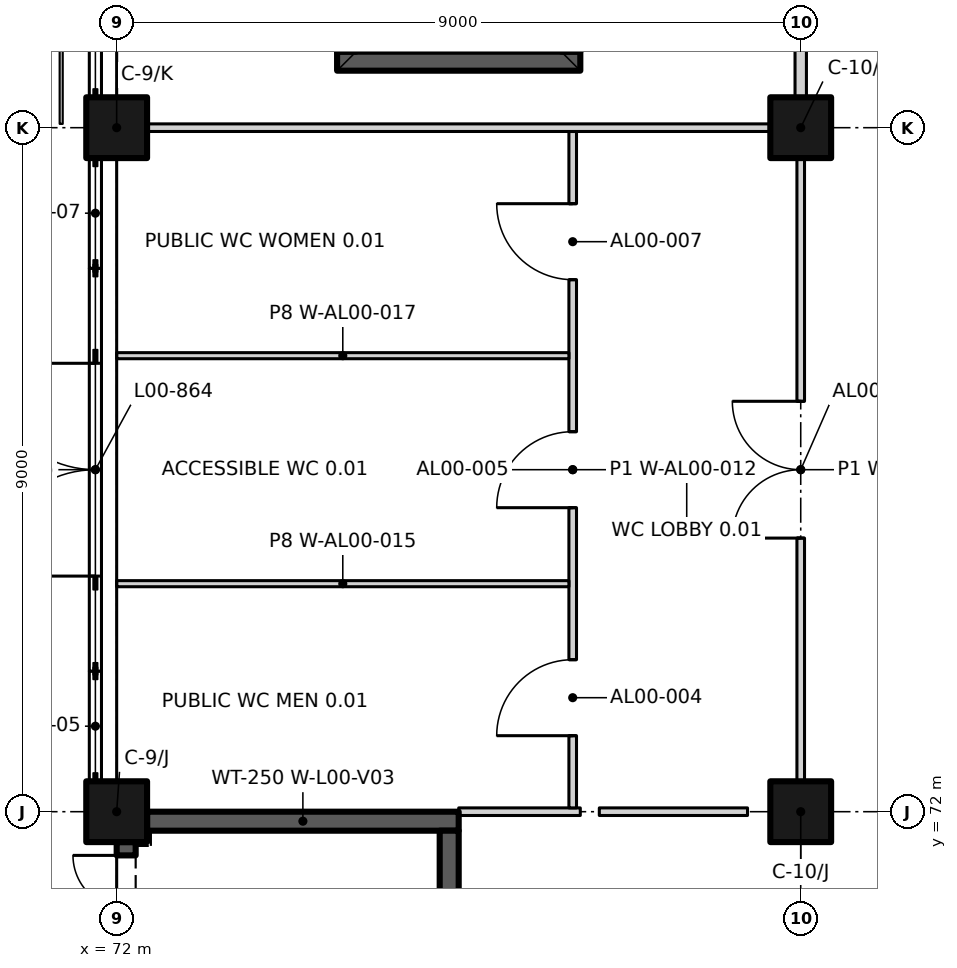
"""IFC4 building model, lengths in metres.
Left out: names, types, materials, properties, quantities, classifications, styles, units other than length and angle.
Written with IfcOpenShell. Run it as: python <this file> out.ifc"""

import sys

from ifc_helpers import new_model, si_unit, direction, frame, frame_2d, origin, origin_2d, place, context, subcontext, project, spatial, rectangle, extrude, element, fill, save


model = new_model("IFC4")
c1 = context("Model", 3, precision=1e-05, world=origin(), true_north=direction((0.0, 1.0)))
c2 = subcontext(c1, "Body", "Model", "MODEL_VIEW")
j1 = project(units=[si_unit("LENGTHUNIT", "METRE"), si_unit("PLANEANGLEUNIT", "RADIAN")], contexts=[c1])
p1 = place(None, origin())
s1 = spatial("IfcSite", under=j1, at=p1, CompositionType="ELEMENT")
p2 = place(p1, origin())
s2 = spatial("IfcBuilding", under=s1, at=p2, CompositionType="ELEMENT")
p3 = place(p2, origin())
s3 = spatial("IfcBuildingStorey", under=s2, at=p3, CompositionType="ELEMENT", Elevation=0.0)
for number, where, z_axis, x_axis in (
    (1, (72.0, 72.0, 0.0), (0.0, 0.0, 1.0), (1.0, 0.0, 0.0)),
    (2, (81.0, 72.0, 0.0), (0.0, 0.0, 1.0), (1.0, 0.0, 0.0)),
    (3, (72.0, 81.0, 0.0), (0.0, 0.0, 1.0), (1.0, 0.0, 0.0)),
    (4, (81.0, 81.0, 0.0), (0.0, 0.0, 1.0), (1.0, 0.0, 0.0)),
):
    element("IfcColumn", number, at=place(p3, frame(where, z_axis=z_axis, x_axis=x_axis)), inside=s3, PredefinedType="COLUMN", context=c2, shape_type="SweptSolid", body=[
        extrude(rectangle(XDim=0.8, YDim=0.8, at=origin_2d()), origin(), (0.0, 0.0, 1.0), 6.0),
    ])
p4 = place(p3, frame((72.4, 71.875, 0.0), z_axis=(0.0, 0.0, 1.0), x_axis=(1.0, 0.0, 0.0)))
e5 = element("IfcWall", 5, at=p4, inside=s3, PredefinedType="SHEAR", context=c2, shape_type="SweptSolid", body=[
    extrude(rectangle(XDim=4.1, YDim=0.25, at=frame_2d((2.05, 0.0))), origin(), (0.0, 0.0, 1.0), 5.7),
])
p5 = place(p3, frame((72.125, 63.4, 0.0), z_axis=(0.0, 0.0, 1.0), x_axis=(0.0, 1.0, 0.0)))
e6 = element("IfcWall", 6, at=p5, inside=s3, PredefinedType="SHEAR", context=c2, shape_type="SweptSolid", body=[
    extrude(rectangle(XDim=8.2, YDim=0.25, at=frame_2d((4.1, 0.0))), origin(), (0.0, 0.0, 1.0), 5.2),
])
p6 = place(p5, frame((6.625, 0.0, 0.0)))
e7 = element("IfcOpeningElement", 7, at=p6, cuts=e6, PredefinedType="OPENING", context=c2, shape_type="SweptSolid", body=[
    extrude(rectangle(XDim=1.4, YDim=2.1, at=frame_2d((0.7, 1.05))), frame((0.0, 0.135, 0.0), z_axis=(0.0, -1.0, 0.0), x_axis=(1.0, 0.0, 0.0)), (0.0, 0.0, 1.0), 0.27),
])
p7 = place(p3, frame((76.375, 63.25, 0.0), z_axis=(0.0, 0.0, 1.0), x_axis=(0.0, 1.0, 0.0)))
e8 = element("IfcWall", 8, at=p7, inside=s3, PredefinedType="SHEAR", context=c2, shape_type="SweptSolid", body=[
    extrude(rectangle(XDim=8.5, YDim=0.25, at=frame_2d((4.25, 0.0))), origin(), (0.0, 0.0, 1.0), 5.7),
])
p8 = place(p3, frame((74.9, 81.875, 0.0), z_axis=(0.0, 0.0, 1.0), x_axis=(1.0, 0.0, 0.0)))
e9 = element("IfcWall", 9, at=p8, inside=s3, PredefinedType="SHEAR", context=c2, shape_type="SweptSolid", body=[
    extrude(rectangle(XDim=3.2, YDim=0.25, at=frame_2d((1.6, 0.0))), origin(), (0.0, 0.0, 1.0), 6.0),
])
p9 = place(p3, frame((71.72, 75.03, 0.0), z_axis=(0.0, 0.0, 1.0), x_axis=(0.0, 1.0, 0.0)))
e10 = element("IfcWall", 10, at=p9, inside=s3, PredefinedType="STANDARD", context=c2, shape_type="SweptSolid", body=[
    extrude(rectangle(XDim=2.94, YDim=0.12, at=frame_2d((1.47, 0.0))), origin(), (0.0, 0.0, 1.0), 2.97),
])
p10 = place(p9, frame((0.07, 0.0, 0.0)))
e11 = element("IfcOpeningElement", 11, at=p10, cuts=e10, PredefinedType="OPENING", context=c2, shape_type="SweptSolid", body=[
    extrude(rectangle(XDim=2.8, YDim=2.4, at=frame_2d((1.4, 1.2))), frame((0.0, 0.07, 0.0), z_axis=(0.0, -1.0, 0.0), x_axis=(1.0, 0.0, 0.0)), (0.0, 0.0, 1.0), 0.14),
])
p11 = place(p3, frame((76.5, 72.0, 0.0), z_axis=(0.0, 0.0, 1.0), x_axis=(1.0, 0.0, 0.0)))
e12 = element("IfcWall", 12, at=p11, inside=s3, PredefinedType="PARTITIONING", context=c2, shape_type="SweptSolid", body=[
    extrude(rectangle(XDim=1.6, YDim=0.1, at=frame_2d((0.8, 0.0))), origin(), (0.0, 0.0, 1.0), 5.65),
])
p12 = place(p3, frame((78.35, 72.0, 0.0), z_axis=(0.0, 0.0, 1.0), x_axis=(1.0, 0.0, 0.0)))
e13 = element("IfcWall", 13, at=p12, inside=s3, PredefinedType="PARTITIONING", context=c2, shape_type="SweptSolid", body=[
    extrude(rectangle(XDim=1.95, YDim=0.1, at=frame_2d((0.975, 0.0))), origin(), (0.0, 0.0, 1.0), 5.65),
])
p13 = place(p3, frame((78.0, 72.05, 0.0), z_axis=(0.0, 0.0, 1.0), x_axis=(0.0, 1.0, 0.0)))
e14 = element("IfcWall", 14, at=p13, inside=s3, PredefinedType="PARTITIONING", context=c2, shape_type="SweptSolid", body=[
    extrude(rectangle(XDim=8.9, YDim=0.1, at=frame_2d((4.45, 0.0))), origin(), (0.0, 0.0, 1.0), 5.2),
])
p14 = place(p13, frame((0.95, 0.0, 0.0)))
e15 = element("IfcOpeningElement", 15, at=p14, cuts=e14, PredefinedType="OPENING", context=c2, shape_type="SweptSolid", body=[
    extrude(rectangle(XDim=1.0, YDim=2.1, at=frame_2d((0.5, 1.05))), frame((0.0, 0.06, 0.0), z_axis=(0.0, -1.0, 0.0), x_axis=(1.0, 0.0, 0.0)), (0.0, 0.0, 1.0), 0.12),
])
p15 = place(p13, frame((3.95, 0.0, 0.0)))
e16 = element("IfcOpeningElement", 16, at=p15, cuts=e14, PredefinedType="OPENING", context=c2, shape_type="SweptSolid", body=[
    extrude(rectangle(XDim=1.0, YDim=2.1, at=frame_2d((0.5, 1.05))), frame((0.0, 0.06, 0.0), z_axis=(0.0, -1.0, 0.0), x_axis=(1.0, 0.0, 0.0)), (0.0, 0.0, 1.0), 0.12),
])
p16 = place(p13, frame((6.95, 0.0, 0.0)))
e17 = element("IfcOpeningElement", 17, at=p16, cuts=e14, PredefinedType="OPENING", context=c2, shape_type="SweptSolid", body=[
    extrude(rectangle(XDim=1.0, YDim=2.1, at=frame_2d((0.5, 1.05))), frame((0.0, 0.06, 0.0), z_axis=(0.0, -1.0, 0.0), x_axis=(1.0, 0.0, 0.0)), (0.0, 0.0, 1.0), 0.12),
])
p17 = place(p3, frame((81.0, 72.4, 0.0), z_axis=(0.0, 0.0, 1.0), x_axis=(0.0, 1.0, 0.0)))
e18 = element("IfcWall", 18, at=p17, inside=s3, PredefinedType="PARTITIONING", context=c2, shape_type="SweptSolid", body=[
    extrude(rectangle(XDim=8.2, YDim=0.1, at=frame_2d((4.1, 0.0))), origin(), (0.0, 0.0, 1.0), 5.2),
])
p18 = place(p17, frame((3.2, 0.0, 0.0)))
e19 = element("IfcOpeningElement", 19, at=p18, cuts=e18, PredefinedType="OPENING", context=c2, shape_type="SweptSolid", body=[
    extrude(rectangle(XDim=1.8, YDim=2.1, at=frame_2d((0.9, 1.05))), frame((0.0, 0.06, 0.0), z_axis=(0.0, -1.0, 0.0), x_axis=(1.0, 0.0, 0.0)), (0.0, 0.0, 1.0), 0.12),
])
for number, where, z_axis, x_axis in (
    (20, (72.0, 75.0, 0.0), (0.0, 0.0, 1.0), (1.0, 0.0, 0.0)),
    (21, (72.0, 78.0, 0.0), (0.0, 0.0, 1.0), (1.0, 0.0, 0.0)),
):
    element("IfcWall", number, at=place(p3, frame(where, z_axis=z_axis, x_axis=x_axis)), inside=s3, PredefinedType="PARTITIONING", context=c2, shape_type="SweptSolid", body=[
        extrude(rectangle(XDim=5.95, YDim=0.08, at=frame_2d((2.975, 0.0))), origin(), (0.0, 0.0, 1.0), 4.95),
    ])
p19 = place(p3, frame((72.4, 81.0, 0.0), z_axis=(0.0, 0.0, 1.0), x_axis=(1.0, 0.0, 0.0)))
e22 = element("IfcWall", 22, at=p19, inside=s3, PredefinedType="PARTITIONING", context=c2, shape_type="SweptSolid", body=[
    extrude(rectangle(XDim=8.2, YDim=0.1, at=frame_2d((4.1, 0.0))), origin(), (0.0, 0.0, 1.0), 5.2),
])
p20 = place(p3, frame((81.0, 81.4, 0.0), z_axis=(0.0, 0.0, 1.0), x_axis=(0.0, 1.0, 0.0)))
e23 = element("IfcWall", 23, at=p20, inside=s3, PredefinedType="PARTITIONING", context=c2, shape_type="SweptSolid", body=[
    extrude(rectangle(XDim=8.2, YDim=0.15, at=frame_2d((4.1, 0.0))), origin(), (0.0, 0.0, 1.0), 5.2),
])
p21 = place(p20, frame((5.95, 0.0, 0.0)))
e24 = element("IfcOpeningElement", 24, at=p21, cuts=e23, PredefinedType="OPENING", context=c2, shape_type="SweptSolid", body=[
    extrude(rectangle(XDim=1.8, YDim=2.1, at=frame_2d((0.9, 1.05))), frame((0.0, 0.085, 0.0), z_axis=(0.0, -1.0, 0.0), x_axis=(1.0, 0.0, 0.0)), (0.0, 0.0, 1.0), 0.17),
])
p22 = place(p6, origin())
e25 = element("IfcDoor", 25, at=p22, inside=s3, OperationType="DOUBLE_DOOR_SINGLE_SWING", PredefinedType="DOOR", context=c2, shape_type="SweptSolid", body=[
    extrude(rectangle(XDim=1.4, YDim=2.1, at=frame_2d((0.7, 1.05))), frame((0.0, 0.025, 0.0), z_axis=(0.0, -1.0, 0.0), x_axis=(1.0, 0.0, 0.0)), (0.0, 0.0, 1.0), 0.05),
])
fill(e7, e25)
p23 = place(p10, origin())
e26 = element("IfcDoor", 26, at=p23, inside=s3, OperationType="DOUBLE_DOOR_SINGLE_SWING", PredefinedType="DOOR", context=c2, shape_type="SweptSolid", body=[
    extrude(rectangle(XDim=2.8, YDim=2.4, at=frame_2d((1.4, 1.2))), frame((0.0, 0.025, 0.0), z_axis=(0.0, -1.0, 0.0), x_axis=(1.0, 0.0, 0.0)), (0.0, 0.0, 1.0), 0.05),
])
fill(e11, e26)
p24 = place(p14, origin())
e27 = element("IfcDoor", 27, at=p24, inside=s3, OperationType="SINGLE_SWING_LEFT", PredefinedType="DOOR", context=c2, shape_type="SweptSolid", body=[
    extrude(rectangle(XDim=1.0, YDim=2.1, at=frame_2d((0.5, 1.05))), frame((0.0, 0.025, 0.0), z_axis=(0.0, -1.0, 0.0), x_axis=(1.0, 0.0, 0.0)), (0.0, 0.0, 1.0), 0.05),
])
fill(e15, e27)
p25 = place(p15, origin())
e28 = element("IfcDoor", 28, at=p25, inside=s3, OperationType="SINGLE_SWING_LEFT", PredefinedType="DOOR", context=c2, shape_type="SweptSolid", body=[
    extrude(rectangle(XDim=1.0, YDim=2.1, at=frame_2d((0.5, 1.05))), frame((0.0, 0.025, 0.0), z_axis=(0.0, -1.0, 0.0), x_axis=(1.0, 0.0, 0.0)), (0.0, 0.0, 1.0), 0.05),
])
fill(e16, e28)
p26 = place(p18, origin())
e29 = element("IfcDoor", 29, at=p26, inside=s3, OperationType="DOUBLE_DOOR_SINGLE_SWING", PredefinedType="DOOR", context=c2, shape_type="SweptSolid", body=[
    extrude(rectangle(XDim=1.8, YDim=2.1, at=frame_2d((0.9, 1.05))), frame((0.0, 0.025, 0.0), z_axis=(0.0, -1.0, 0.0), x_axis=(1.0, 0.0, 0.0)), (0.0, 0.0, 1.0), 0.05),
])
fill(e19, e29)
p27 = place(p16, origin())
e30 = element("IfcDoor", 30, at=p27, inside=s3, OperationType="SINGLE_SWING_RIGHT", PredefinedType="DOOR", context=c2, shape_type="SweptSolid", body=[
    extrude(rectangle(XDim=1.0, YDim=2.1, at=frame_2d((0.5, 1.05))), frame((0.0, 0.025, 0.0), z_axis=(0.0, -1.0, 0.0), x_axis=(1.0, 0.0, 0.0)), (0.0, 0.0, 1.0), 0.05),
])
fill(e17, e30)
save(model, sys.argv[1])
